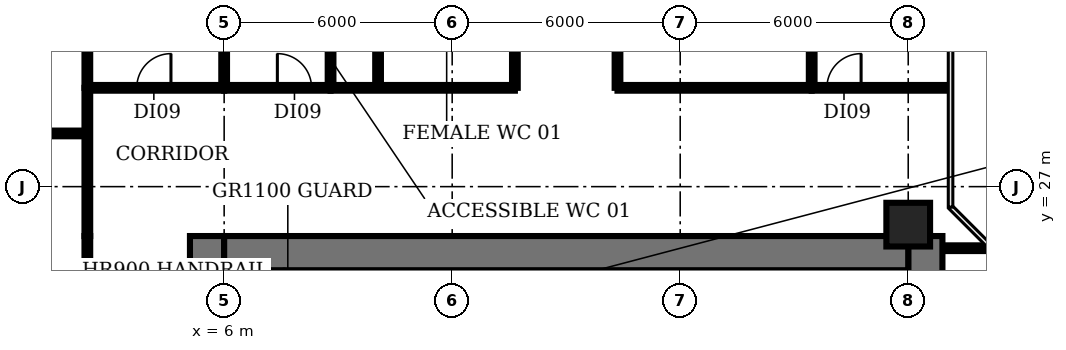
"""IFC4 building model, lengths in metres.
Left out: names, types, materials, properties, quantities, classifications, styles, units other than length and angle.
Written with IfcOpenShell. Run it as: python <this file> out.ifc"""

import sys

from ifc_helpers import new_model, si_unit, direction, frame, frame_2d, origin, origin_2d, place, context, subcontext, project, spatial, rectangle, circle, extrude, element, fill, save


model = new_model("IFC4")
c1 = context("Model", 3, precision=1e-05, world=origin(), true_north=direction((0.0, 1.0)))
c2 = subcontext(c1, "Body", "Model", "MODEL_VIEW")
j1 = project(units=[si_unit("LENGTHUNIT", "METRE"), si_unit("PLANEANGLEUNIT", "RADIAN")], contexts=[c1])
p1 = place(None, origin())
s1 = spatial("IfcSite", under=j1, at=p1, CompositionType="ELEMENT")
p2 = place(p1, origin())
s2 = spatial("IfcBuilding", under=s1, at=p2, CompositionType="ELEMENT")
p3 = place(p2, frame((0.0, 0.0, 75.2)))
s3 = spatial("IfcBuildingStorey", under=s2, at=p3, CompositionType="ELEMENT", Elevation=75.2)
p4 = place(p3, frame((24.0, 26.0, 0.0), z_axis=(0.0, 0.0, 1.0), x_axis=(1.0, 0.0, 0.0)))
e1 = element("IfcColumn", 1, at=p4, inside=s3, PredefinedType="COLUMN", context=c2, shape_type="SweptSolid", body=[
    extrude(circle(Radius=0.575, at=origin_2d()), origin(), (0.0, 0.0, 1.0), 3.2),
])
p5 = place(p3, frame((9.275, 18.375, 0.0), z_axis=(0.0, 0.0, 1.0), x_axis=(0.0, 1.0, 0.0)))
e2 = element("IfcWall", 2, at=p5, inside=s3, PredefinedType="SHEAR", context=c2, shape_type="SweptSolid", body=[
    extrude(rectangle(XDim=6.425, YDim=0.25, at=frame_2d((3.212, 0.0))), origin(), (0.0, 0.0, 1.0), 3.8),
])
for number, where, z_axis, x_axis in (
    (3, (15.1, 22.9, 0.0), (0.0, 0.0, 1.0), (0.0, 1.0, 0.0)),
    (4, (20.7, 22.9, 0.0), (0.0, 0.0, 1.0), (0.0, 1.0, 0.0)),
):
    element("IfcWall", number, at=place(p3, frame(where, z_axis=z_axis, x_axis=x_axis)), inside=s3, PredefinedType="SHEAR", context=c2, shape_type="SweptSolid", body=[
        extrude(rectangle(XDim=1.9, YDim=0.2, at=frame_2d((0.95, 0.0))), origin(), (0.0, 0.0, 1.0), 3.8),
    ])
p6 = place(p3, frame((5.55, 4.5, 0.0), z_axis=(0.0, 0.0, 1.0), x_axis=(0.0, 1.0, 0.0)))
e5 = element("IfcWall", 5, at=p6, inside=s3, PredefinedType="SHEAR", context=c2, shape_type="SweptSolid", body=[
    extrude(rectangle(XDim=21.2, YDim=0.9, at=frame_2d((10.6, 0.0))), origin(), (0.0, 0.0, 1.0), 3.8),
])
p7 = place(p6, frame((1.15, 0.0, 0.0)))
e6 = element("IfcOpeningElement", 6, at=p7, cuts=e5, PredefinedType="OPENING", context=c2, shape_type="SweptSolid", body=[
    extrude(rectangle(XDim=1.5, YDim=2.1, at=frame_2d((0.75, 1.05))), frame((0.0, 0.46, 0.0), z_axis=(0.0, -1.0, 0.0), x_axis=(1.0, 0.0, 0.0)), (0.0, 0.0, 1.0), 0.92),
])
p8 = place(p6, frame((7.6, 0.0, 0.0)))
e7 = element("IfcOpeningElement", 7, at=p8, cuts=e5, PredefinedType="OPENING", context=c2, shape_type="SweptSolid", body=[
    extrude(rectangle(XDim=1.2, YDim=2.1, at=frame_2d((0.6, 1.05))), frame((0.0, 0.46, 0.0), z_axis=(0.0, -1.0, 0.0), x_axis=(1.0, 0.0, 0.0)), (0.0, 0.0, 1.0), 0.92),
])
p9 = place(p6, frame((14.15, 0.0, 0.0)))
e8 = element("IfcOpeningElement", 8, at=p9, cuts=e5, PredefinedType="OPENING", context=c2, shape_type="SweptSolid", body=[
    extrude(rectangle(XDim=1.2, YDim=2.1, at=frame_2d((0.6, 1.05))), frame((0.0, 0.46, 0.0), z_axis=(0.0, -1.0, 0.0), x_axis=(1.0, 0.0, 0.0)), (0.0, 0.0, 1.0), 0.92),
])
p10 = place(p3, frame((24.45, 25.7, 0.0), z_axis=(0.0, 0.0, 1.0), x_axis=(0.0, -1.0, 0.0)))
e9 = element("IfcWall", 9, at=p10, inside=s3, PredefinedType="SHEAR", context=c2, shape_type="SweptSolid", body=[
    extrude(rectangle(XDim=21.2, YDim=0.9, at=frame_2d((10.6, 0.0))), origin(), (0.0, 0.0, 1.0), 3.8),
])
p11 = place(p10, frame((18.55, 0.0, 0.0)))
e10 = element("IfcOpeningElement", 10, at=p11, cuts=e9, PredefinedType="OPENING", context=c2, shape_type="SweptSolid", body=[
    extrude(rectangle(XDim=1.5, YDim=2.1, at=frame_2d((0.75, 1.05))), frame((0.0, 0.46, 0.0), z_axis=(0.0, -1.0, 0.0), x_axis=(1.0, 0.0, 0.0)), (0.0, 0.0, 1.0), 0.92),
])
p12 = place(p10, frame((12.45, 0.0, 0.0)))
e11 = element("IfcOpeningElement", 11, at=p12, cuts=e9, PredefinedType="OPENING", context=c2, shape_type="SweptSolid", body=[
    extrude(rectangle(XDim=0.9, YDim=2.1, at=frame_2d((0.45, 1.05))), frame((0.0, 0.46, 0.0), z_axis=(0.0, -1.0, 0.0), x_axis=(1.0, 0.0, 0.0)), (0.0, 0.0, 1.0), 0.92),
])
p13 = place(p10, frame((6.45, 0.0, 0.0)))
e12 = element("IfcOpeningElement", 12, at=p13, cuts=e9, PredefinedType="OPENING", context=c2, shape_type="SweptSolid", body=[
    extrude(rectangle(XDim=2.0, YDim=2.1, at=frame_2d((1.0, 1.05))), frame((0.0, 0.46, 0.0), z_axis=(0.0, -1.0, 0.0), x_axis=(1.0, 0.0, 0.0)), (0.0, 0.0, 1.0), 0.92),
])
p14 = place(p3, frame((6.0, 25.25, 0.0), z_axis=(0.0, 0.0, 1.0), x_axis=(1.0, 0.0, 0.0)))
e13 = element("IfcWall", 13, at=p14, inside=s3, PredefinedType="SHEAR", context=c2, shape_type="SweptSolid", body=[
    extrude(rectangle(XDim=18.0, YDim=0.9, at=frame_2d((9.0, 0.0))), origin(), (0.0, 0.0, 1.0), 3.8),
])
p15 = place(p3, frame((-1.59, 28.4, 0.0), z_axis=(0.0, 0.0, 1.0), x_axis=(1.0, 0.0, 0.0)))
e14 = element("IfcWall", 14, at=p15, inside=s3, PredefinedType="PARTITIONING", context=c2, shape_type="SweptSolid", body=[
    extrude(rectangle(XDim=3.99, YDim=0.15, at=frame_2d((1.995, 0.0))), origin(), (0.0, 0.0, 1.0), 2.78),
])
p16 = place(p3, frame((2.4, 4.5, 0.0), z_axis=(0.0, 0.0, 1.0), x_axis=(0.0, 1.0, 0.0)))
e15 = element("IfcWall", 15, at=p16, inside=s3, PredefinedType="PARTITIONING", context=c2, shape_type="SweptSolid", body=[
    extrude(rectangle(XDim=21.2, YDim=0.15, at=frame_2d((10.6, 0.0))), origin(), (0.0, 0.0, 1.0), 2.78),
])
p17 = place(p16, frame((10.8, 0.0, 0.0)))
e16 = element("IfcOpeningElement", 16, at=p17, cuts=e15, PredefinedType="OPENING", context=c2, shape_type="SweptSolid", body=[
    extrude(rectangle(XDim=1.2, YDim=2.1, at=frame_2d((0.6, 1.05))), frame((0.0, 0.085, 0.0), z_axis=(0.0, -1.0, 0.0), x_axis=(1.0, 0.0, 0.0)), (0.0, 0.0, 1.0), 0.17),
])
p18 = place(p3, frame((2.4, 25.7, 0.0), z_axis=(0.0, 0.0, 1.0), x_axis=(0.0, 1.0, 0.0)))
e17 = element("IfcWall", 17, at=p18, inside=s3, PredefinedType="PARTITIONING", context=c2, shape_type="SweptSolid", body=[
    extrude(rectangle(XDim=3.9, YDim=0.15, at=frame_2d((1.95, 0.0))), origin(), (0.0, 0.0, 1.0), 2.78),
])
p19 = place(p3, frame((2.4, 29.6, 0.0), z_axis=(0.0, 0.0, 1.0), x_axis=(0.0, 1.0, 0.0)))
e18 = element("IfcWall", 18, at=p19, inside=s3, PredefinedType="PARTITIONING", context=c2, shape_type="SweptSolid", body=[
    extrude(rectangle(XDim=4.8, YDim=0.15, at=frame_2d((2.4, 0.0))), origin(), (0.0, 0.0, 1.0), 2.78),
])
p20 = place(p3, frame((2.4, 29.6, 0.0), z_axis=(0.0, 0.0, 1.0), x_axis=(1.0, 0.0, 0.0)))
e19 = element("IfcWall", 19, at=p20, inside=s3, PredefinedType="PARTITIONING", context=c2, shape_type="SweptSolid", body=[
    extrude(rectangle(XDim=3.6, YDim=0.15, at=frame_2d((1.8, 0.0))), origin(), (0.0, 0.0, 1.0), 2.78),
])
p21 = place(p20, frame((1.3, 0.0, 0.0)))
e20 = element("IfcOpeningElement", 20, at=p21, cuts=e19, PredefinedType="OPENING", context=c2, shape_type="SweptSolid", body=[
    extrude(rectangle(XDim=0.9, YDim=2.1, at=frame_2d((0.45, 1.05))), frame((0.0, 0.085, 0.0), z_axis=(0.0, -1.0, 0.0), x_axis=(1.0, 0.0, 0.0)), (0.0, 0.0, 1.0), 0.17),
])
p22 = place(p3, frame((6.0, 29.6, 0.0), z_axis=(0.0, 0.0, 1.0), x_axis=(0.0, 1.0, 0.0)))
e21 = element("IfcWall", 21, at=p22, inside=s3, PredefinedType="PARTITIONING", context=c2, shape_type="SweptSolid", body=[
    extrude(rectangle(XDim=4.8, YDim=0.15, at=frame_2d((2.4, 0.0))), origin(), (0.0, 0.0, 1.0), 2.78),
])
p23 = place(p3, frame((6.0, 29.6, 0.0), z_axis=(0.0, 0.0, 1.0), x_axis=(1.0, 0.0, 0.0)))
e22 = element("IfcWall", 22, at=p23, inside=s3, PredefinedType="PARTITIONING", context=c2, shape_type="SweptSolid", body=[
    extrude(rectangle(XDim=2.8, YDim=0.15, at=frame_2d((1.4, 0.0))), origin(), (0.0, 0.0, 1.0), 2.78),
])
p24 = place(p23, frame((1.4, 0.0, 0.0)))
e23 = element("IfcOpeningElement", 23, at=p24, cuts=e22, PredefinedType="OPENING", context=c2, shape_type="SweptSolid", body=[
    extrude(rectangle(XDim=0.9, YDim=2.1, at=frame_2d((0.45, 1.05))), frame((0.0, 0.085, 0.0), z_axis=(0.0, -1.0, 0.0), x_axis=(1.0, 0.0, 0.0)), (0.0, 0.0, 1.0), 0.17),
])
p25 = place(p3, frame((8.8, 29.6, 0.0), z_axis=(0.0, 0.0, 1.0), x_axis=(0.0, 1.0, 0.0)))
e24 = element("IfcWall", 24, at=p25, inside=s3, PredefinedType="PARTITIONING", context=c2, shape_type="SweptSolid", body=[
    extrude(rectangle(XDim=4.8, YDim=0.15, at=frame_2d((2.4, 0.0))), origin(), (0.0, 0.0, 1.0), 2.78),
])
p26 = place(p3, frame((8.8, 29.6, 0.0), z_axis=(0.0, 0.0, 1.0), x_axis=(1.0, 0.0, 0.0)))
e25 = element("IfcWall", 25, at=p26, inside=s3, PredefinedType="PARTITIONING", context=c2, shape_type="SweptSolid", body=[
    extrude(rectangle(XDim=4.85, YDim=0.15, at=frame_2d((2.425, 0.0))), origin(), (0.0, 0.0, 1.0), 2.78),
])
p27 = place(p3, frame((10.05, 29.6, 0.0), z_axis=(0.0, 0.0, 1.0), x_axis=(0.0, 1.0, 0.0)))
e26 = element("IfcWall", 26, at=p27, inside=s3, PredefinedType="PARTITIONING", context=c2, shape_type="SweptSolid", body=[
    extrude(rectangle(XDim=4.8, YDim=0.15, at=frame_2d((2.4, 0.0))), origin(), (0.0, 0.0, 1.0), 2.78),
])
p28 = place(p3, frame((13.65, 29.6, 0.0), z_axis=(0.0, 0.0, 1.0), x_axis=(0.0, 1.0, 0.0)))
e27 = element("IfcWall", 27, at=p28, inside=s3, PredefinedType="PARTITIONING", context=c2, shape_type="SweptSolid", body=[
    extrude(rectangle(XDim=4.8, YDim=0.15, at=frame_2d((2.4, 0.0))), origin(), (0.0, 0.0, 1.0), 2.78),
])
p29 = place(p28, frame((1.9, 0.0, 0.0)))
e28 = element("IfcOpeningElement", 28, at=p29, cuts=e27, PredefinedType="OPENING", context=c2, shape_type="SweptSolid", body=[
    extrude(rectangle(XDim=0.9, YDim=2.1, at=frame_2d((0.45, 1.05))), frame((0.0, 0.085, 0.0), z_axis=(0.0, -1.0, 0.0), x_axis=(1.0, 0.0, 0.0)), (0.0, 0.0, 1.0), 0.17),
])
p30 = place(p3, frame((16.35, 29.6, 0.0), z_axis=(0.0, 0.0, 1.0), x_axis=(0.0, 1.0, 0.0)))
e29 = element("IfcWall", 29, at=p30, inside=s3, PredefinedType="PARTITIONING", context=c2, shape_type="SweptSolid", body=[
    extrude(rectangle(XDim=4.8, YDim=0.15, at=frame_2d((2.4, 0.0))), origin(), (0.0, 0.0, 1.0), 2.78),
])
p31 = place(p3, frame((16.35, 29.6, 0.0), z_axis=(0.0, 0.0, 1.0), x_axis=(1.0, 0.0, 0.0)))
e30 = element("IfcWall", 30, at=p31, inside=s3, PredefinedType="PARTITIONING", context=c2, shape_type="SweptSolid", body=[
    extrude(rectangle(XDim=5.11, YDim=0.15, at=frame_2d((2.555, 0.0))), origin(), (0.0, 0.0, 1.0), 2.78),
])
p32 = place(p3, frame((21.46, 29.6, 0.0), z_axis=(0.0, 0.0, 1.0), x_axis=(0.0, 1.0, 0.0)))
e31 = element("IfcWall", 31, at=p32, inside=s3, PredefinedType="PARTITIONING", context=c2, shape_type="SweptSolid", body=[
    extrude(rectangle(XDim=4.8, YDim=0.15, at=frame_2d((2.4, 0.0))), origin(), (0.0, 0.0, 1.0), 2.78),
])
p33 = place(p3, frame((21.46, 29.6, 0.0), z_axis=(0.0, 0.0, 1.0), x_axis=(1.0, 0.0, 0.0)))
e32 = element("IfcWall", 32, at=p33, inside=s3, PredefinedType="PARTITIONING", context=c2, shape_type="SweptSolid", body=[
    extrude(rectangle(XDim=3.6, YDim=0.15, at=frame_2d((1.8, 0.0))), origin(), (0.0, 0.0, 1.0), 2.78),
])
p34 = place(p33, frame((0.4, 0.0, 0.0)))
e33 = element("IfcOpeningElement", 33, at=p34, cuts=e32, PredefinedType="OPENING", context=c2, shape_type="SweptSolid", body=[
    extrude(rectangle(XDim=0.9, YDim=2.1, at=frame_2d((0.45, 1.05))), frame((0.0, 0.085, 0.0), z_axis=(0.0, -1.0, 0.0), x_axis=(1.0, 0.0, 0.0)), (0.0, 0.0, 1.0), 0.17),
])
p35 = place(p3, frame((25.0, 25.38, 0.0), z_axis=(0.0, 0.0, 1.0), x_axis=(1.0, 0.0, 0.0)))
e34 = element("IfcWall", 34, at=p35, inside=s3, PredefinedType="PARTITIONING", context=c2, shape_type="SweptSolid", body=[
    extrude(rectangle(XDim=1.13, YDim=0.15, at=frame_2d((0.565, 0.0))), origin(), (0.0, 0.0, 1.0), 2.78),
])
p36 = place(p21, origin())
e35 = element("IfcDoor", 35, at=p36, inside=s3, OperationType="SINGLE_SWING_RIGHT", PredefinedType="DOOR", context=c2, shape_type="SweptSolid", body=[
    extrude(rectangle(XDim=0.9, YDim=2.1, at=frame_2d((0.45, 1.05))), frame((0.0, 0.025, 0.0), z_axis=(0.0, -1.0, 0.0), x_axis=(1.0, 0.0, 0.0)), (0.0, 0.0, 1.0), 0.05),
])
fill(e20, e35)
p37 = place(p24, origin())
e36 = element("IfcDoor", 36, at=p37, inside=s3, OperationType="SINGLE_SWING_LEFT", PredefinedType="DOOR", context=c2, shape_type="SweptSolid", body=[
    extrude(rectangle(XDim=0.9, YDim=2.1, at=frame_2d((0.45, 1.05))), frame((0.0, 0.025, 0.0), z_axis=(0.0, -1.0, 0.0), x_axis=(1.0, 0.0, 0.0)), (0.0, 0.0, 1.0), 0.05),
])
fill(e23, e36)
p38 = place(p34, origin())
e37 = element("IfcDoor", 37, at=p38, inside=s3, OperationType="SINGLE_SWING_RIGHT", PredefinedType="DOOR", context=c2, shape_type="SweptSolid", body=[
    extrude(rectangle(XDim=0.9, YDim=2.1, at=frame_2d((0.45, 1.05))), frame((0.0, 0.025, 0.0), z_axis=(0.0, -1.0, 0.0), x_axis=(1.0, 0.0, 0.0)), (0.0, 0.0, 1.0), 0.05),
])
fill(e33, e37)
save(model, sys.argv[1])
